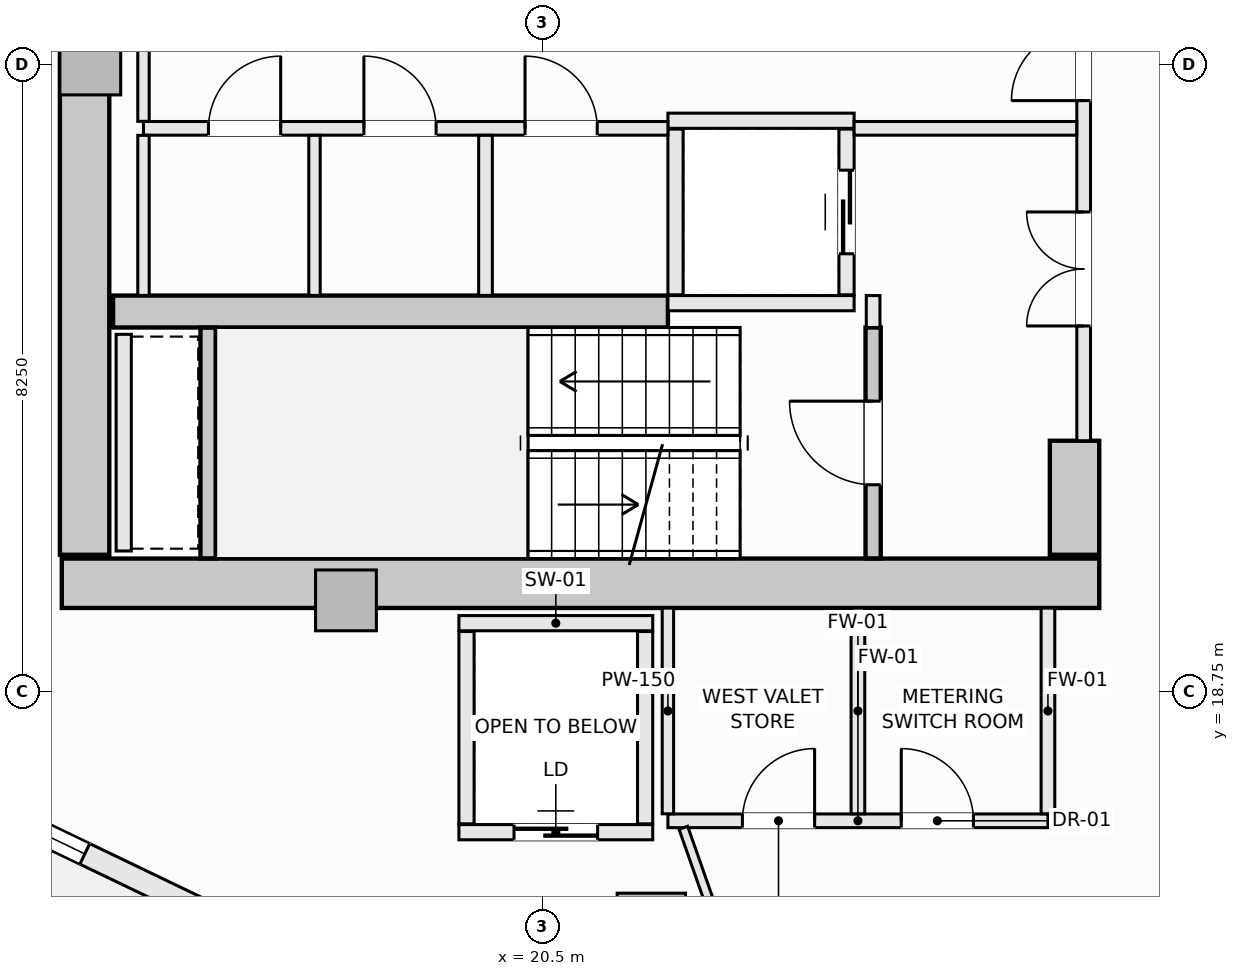
"""IFC4 building model, lengths in metres.
Left out: names, types, materials, properties, quantities, classifications, styles, units other than length and angle.
Written with IfcOpenShell. Run it as: python <this file> out.ifc"""

import sys

from ifc_helpers import new_model, si_unit, direction, frame, frame_2d, origin, origin_2d, place, context, subcontext, project, spatial, rectangle, extrude, element, fill, save


model = new_model("IFC4")
c1 = context("Model", 3, precision=1e-05, world=origin(), true_north=direction((0.0, 1.0)))
c2 = subcontext(c1, "Body", "Model", "MODEL_VIEW")
j1 = project(units=[si_unit("LENGTHUNIT", "METRE"), si_unit("PLANEANGLEUNIT", "RADIAN")], contexts=[c1])
p1 = place(None, origin())
s1 = spatial("IfcSite", under=j1, at=p1, CompositionType="ELEMENT")
p2 = place(p1, origin())
s2 = spatial("IfcBuilding", under=s1, at=p2, CompositionType="ELEMENT")
p3 = place(p2, frame((0.0, 0.0, 176.7)))
s3 = spatial("IfcBuildingStorey", under=s2, at=p3, CompositionType="ELEMENT", Elevation=176.7)
p4 = place(p3, frame((14.175, 20.175, -0.27), z_axis=(0.0, 0.0, 1.0), x_axis=(1.0, 0.0, 0.0)))
e1 = element("IfcWall", 1, at=p4, inside=s3, PredefinedType="SHEAR", context=c2, shape_type="SweptSolid", body=[
    extrude(rectangle(XDim=13.65, YDim=0.65, at=frame_2d((6.825, 0.0))), origin(), (0.0, 0.0, 1.0), 3.4),
])
p5 = place(p3, frame((14.475, 20.55, -0.27), z_axis=(0.0, 0.0, 1.0), x_axis=(0.0, 1.0, 0.0)))
e2 = element("IfcWall", 2, at=p5, inside=s3, PredefinedType="SHEAR", context=c2, shape_type="SweptSolid", body=[
    extrude(rectangle(XDim=12.9, YDim=0.65, at=frame_2d((6.45, 0.0))), origin(), (0.0, 0.0, 1.0), 3.4),
])
p6 = place(p3, frame((27.5, 20.55, -0.27), z_axis=(0.0, 0.0, 1.0), x_axis=(0.0, 1.0, 0.0)))
e3 = element("IfcWall", 3, at=p6, inside=s3, PredefinedType="SHEAR", context=c2, shape_type="SweptSolid", body=[
    extrude(rectangle(XDim=1.5, YDim=0.65, at=frame_2d((0.75, 0.0))), origin(), (0.0, 0.0, 1.0), 3.4),
])
p7 = place(p3, frame((14.85, 23.75, -0.27), z_axis=(0.0, 0.0, 1.0), x_axis=(1.0, 0.0, 0.0)))
e4 = element("IfcWall", 4, at=p7, inside=s3, PredefinedType="SHEAR", context=c2, shape_type="SweptSolid", body=[
    extrude(rectangle(XDim=7.3, YDim=0.42, at=frame_2d((3.65, 0.0))), origin(), (0.0, 0.0, 1.0), 3.4),
])
p8 = place(p3, frame((21.932, 15.648, -0.27), z_axis=(0.0, 0.0, 1.0), x_axis=(1.0, 0.0, 0.0)))
e5 = element("IfcColumn", 5, at=p8, inside=s3, PredefinedType="COLUMN", context=c2, shape_type="SweptSolid", body=[
    extrude(rectangle(XDim=0.9, YDim=0.9, at=origin_2d()), origin(), (0.0, 0.0, 1.0), 3.4),
])
for number, where, z_axis, x_axis in (
    (6, (14.55, 27.0, -0.27), (0.0, 0.0, 1.0), (1.0, 0.0, 0.0)),
    (7, (17.914, 19.95, -0.27), (0.0, 0.0, 1.0), (1.0, 0.0, 0.0)),
):
    element("IfcColumn", number, at=place(p3, frame(where, z_axis=z_axis, x_axis=x_axis)), inside=s3, PredefinedType="PILASTER", context=c2, shape_type="SweptSolid", body=[
        extrude(rectangle(XDim=0.8, YDim=0.8, at=origin_2d()), origin(), (0.0, 0.0, 1.0), 3.4),
    ])
p9 = place(p3, frame((11.127, 18.225, 0.0), z_axis=(0.0, 0.0, 1.0), x_axis=(0.901353070301, -0.433085029363, 0.0)))
e8 = element("IfcWall", 8, at=p9, inside=s3, PredefinedType="SOLIDWALL", context=c2, shape_type="SweptSolid", body=[
    extrude(rectangle(XDim=5.336, YDim=0.3, at=frame_2d((2.668, 0.0))), origin(), (0.0, 0.0, 1.0), 2.653),
])
p10 = place(p9, frame((1.618, 0.0, 0.74)))
e9 = element("IfcOpeningElement", 9, at=p10, cuts=e8, PredefinedType="OPENING", context=c2, shape_type="SweptSolid", body=[
    extrude(rectangle(XDim=2.1, YDim=1.7, at=frame_2d((1.05, 0.85))), frame((0.0, 0.16, 0.0), z_axis=(0.0, -1.0, 0.0), x_axis=(1.0, 0.0, 0.0)), (0.0, 0.0, 1.0), 0.32),
])
p11 = place(p3, frame((24.85, 20.502, -0.27), z_axis=(0.0, 0.0, 1.0), x_axis=(0.0, 1.0, 0.0)))
e10 = element("IfcWall", 10, at=p11, inside=s3, PredefinedType="SHEAR", context=c2, shape_type="SweptSolid", body=[
    extrude(rectangle(XDim=3.038, YDim=0.2, at=frame_2d((1.519, 0.0))), origin(), (0.0, 0.0, 1.0), 3.4),
])
p12 = place(p11, frame((0.969, 0.0, 0.27)))
e11 = element("IfcOpeningElement", 11, at=p12, cuts=e10, PredefinedType="OPENING", context=c2, shape_type="SweptSolid", body=[
    extrude(rectangle(XDim=1.1, YDim=2.15, at=frame_2d((0.55, 1.075))), frame((0.0, 0.11, 0.0), z_axis=(0.0, -1.0, 0.0), x_axis=(1.0, 0.0, 0.0)), (0.0, 0.0, 1.0), 0.22),
])
p13 = place(p3, frame((16.1, 20.502, -0.27), z_axis=(0.0, 0.0, 1.0), x_axis=(0.0, 1.0, 0.0)))
e12 = element("IfcWall", 12, at=p13, inside=s3, PredefinedType="SHEAR", context=c2, shape_type="SweptSolid", body=[
    extrude(rectangle(XDim=3.036, YDim=0.2, at=frame_2d((1.518, 0.0))), origin(), (0.0, 0.0, 1.0), 3.4),
])
for number, where, z_axis, x_axis in (
    (13, (22.15, 26.26, 0.0), (0.0, 0.0, 1.0), (1.0, 0.0, 0.0)),
    (14, (22.15, 23.86, 0.0), (0.0, 0.0, 1.0), (1.0, 0.0, 0.0)),
):
    element("IfcWall", number, at=place(p3, frame(where, z_axis=z_axis, x_axis=x_axis)), inside=s3, PredefinedType="SOLIDWALL", context=c2, shape_type="SweptSolid", body=[
        extrude(rectangle(XDim=2.45, YDim=0.2, at=frame_2d((1.225, 0.0))), origin(), (0.0, 0.0, 1.0), 3.13),
    ])
p14 = place(p3, frame((22.25, 23.97, 0.0), z_axis=(0.0, 0.0, 1.0), x_axis=(0.0, 1.0, 0.0)))
e15 = element("IfcWall", 15, at=p14, inside=s3, PredefinedType="SOLIDWALL", context=c2, shape_type="SweptSolid", body=[
    extrude(rectangle(XDim=2.18, YDim=0.2, at=frame_2d((1.09, 0.0))), origin(), (0.0, 0.0, 1.0), 3.13),
])
p15 = place(p3, frame((24.5, 23.97, 0.0), z_axis=(0.0, 0.0, 1.0), x_axis=(0.0, 1.0, 0.0)))
e16 = element("IfcWall", 16, at=p15, inside=s3, PredefinedType="SOLIDWALL", context=c2, shape_type="SweptSolid", body=[
    extrude(rectangle(XDim=2.18, YDim=0.2, at=frame_2d((1.09, 0.0))), origin(), (0.0, 0.0, 1.0), 3.13),
])
p16 = place(p15, frame((0.54, 0.0, 0.0)))
e17 = element("IfcOpeningElement", 17, at=p16, cuts=e16, PredefinedType="OPENING", context=c2, shape_type="SweptSolid", body=[
    extrude(rectangle(XDim=1.1, YDim=2.2, at=frame_2d((0.55, 1.1))), frame((0.0, 0.11, 0.0), z_axis=(0.0, -1.0, 0.0), x_axis=(1.0, 0.0, 0.0)), (0.0, 0.0, 1.0), 0.22),
])
p17 = place(p3, frame((19.4, 19.65, 0.0), z_axis=(0.0, 0.0, 1.0), x_axis=(1.0, 0.0, 0.0)))
e18 = element("IfcWall", 18, at=p17, inside=s3, PredefinedType="SOLIDWALL", context=c2, shape_type="SweptSolid", body=[
    extrude(rectangle(XDim=2.55, YDim=0.2, at=frame_2d((1.275, 0.0))), origin(), (0.0, 0.0, 1.0), 3.13),
])
p18 = place(p3, frame((19.4, 16.9, 0.0), z_axis=(0.0, 0.0, 1.0), x_axis=(1.0, 0.0, 0.0)))
e19 = element("IfcWall", 19, at=p18, inside=s3, PredefinedType="SOLIDWALL", context=c2, shape_type="SweptSolid", body=[
    extrude(rectangle(XDim=2.55, YDim=0.2, at=frame_2d((1.275, 0.0))), origin(), (0.0, 0.0, 1.0), 3.13),
])
p19 = place(p18, frame((0.725, 0.0, 0.0)))
e20 = element("IfcOpeningElement", 20, at=p19, cuts=e19, PredefinedType="OPENING", context=c2, shape_type="SweptSolid", body=[
    extrude(rectangle(XDim=1.1, YDim=2.2, at=frame_2d((0.55, 1.1))), frame((0.0, 0.11, 0.0), z_axis=(0.0, -1.0, 0.0), x_axis=(1.0, 0.0, 0.0)), (0.0, 0.0, 1.0), 0.22),
])
for number, where, z_axis, x_axis in (
    (21, (19.5, 17.01, 0.0), (0.0, 0.0, 1.0), (0.0, 1.0, 0.0)),
    (22, (21.85, 17.01, 0.0), (0.0, 0.0, 1.0), (0.0, 1.0, 0.0)),
):
    element("IfcWall", number, at=place(p3, frame(where, z_axis=z_axis, x_axis=x_axis)), inside=s3, PredefinedType="SOLIDWALL", context=c2, shape_type="SweptSolid", body=[
        extrude(rectangle(XDim=2.53, YDim=0.2, at=frame_2d((1.265, 0.0))), origin(), (0.0, 0.0, 1.0), 3.13),
    ])
p20 = place(p3, frame((14.99, 20.6, 0.0), z_axis=(0.0, 0.0, 1.0), x_axis=(0.0, 1.0, 0.0)))
e23 = element("IfcWall", 23, at=p20, inside=s3, PredefinedType="SOLIDWALL", context=c2, shape_type="SweptSolid", body=[
    extrude(rectangle(XDim=2.85, YDim=0.2, at=frame_2d((1.425, 0.0))), origin(), (0.0, 0.0, 1.0), 3.13),
])
p21 = place(p3, frame((24.85, 23.54, 0.0), z_axis=(0.0, 0.0, 1.0), x_axis=(0.0, 1.0, 0.0)))
e24 = element("IfcWall", 24, at=p21, inside=s3, PredefinedType="SOLIDWALL", context=c2, shape_type="SweptSolid", body=[
    extrude(rectangle(XDim=0.42, YDim=0.18, at=frame_2d((0.21, 0.0))), origin(), (0.0, 0.0, 1.0), 3.13),
])
p22 = place(p3, frame((27.62, 22.05, 0.0), z_axis=(0.0, 0.0, 1.0), x_axis=(0.0, 1.0, 0.0)))
e25 = element("IfcWall", 25, at=p22, inside=s3, PredefinedType="SOLIDWALL", context=c2, shape_type="SweptSolid", body=[
    extrude(rectangle(XDim=9.9, YDim=0.18, at=frame_2d((4.95, 0.0))), origin(), (0.0, 0.0, 1.0), 3.13),
])
p23 = place(p22, frame((4.475, 0.0, 0.0)))
e26 = element("IfcOpeningElement", 26, at=p23, cuts=e25, PredefinedType="OPENING", context=c2, shape_type="SweptSolid", body=[
    extrude(rectangle(XDim=0.95, YDim=2.1, at=frame_2d((0.475, 1.05))), frame((0.0, 0.1, 0.0), z_axis=(0.0, -1.0, 0.0), x_axis=(1.0, 0.0, 0.0)), (0.0, 0.0, 1.0), 0.2),
])
p24 = place(p22, frame((6.89, 0.0, 0.0)))
e27 = element("IfcOpeningElement", 27, at=p24, cuts=e25, PredefinedType="OPENING", context=c2, shape_type="SweptSolid", body=[
    extrude(rectangle(XDim=1.5, YDim=2.2, at=frame_2d((0.75, 1.1))), frame((0.0, 0.1, 0.0), z_axis=(0.0, -1.0, 0.0), x_axis=(1.0, 0.0, 0.0)), (0.0, 0.0, 1.0), 0.2),
])
p25 = place(p22, frame((1.51, 0.0, 0.0)))
e28 = element("IfcOpeningElement", 28, at=p25, cuts=e25, PredefinedType="OPENING", context=c2, shape_type="SweptSolid", body=[
    extrude(rectangle(XDim=1.5, YDim=2.2, at=frame_2d((0.75, 1.1))), frame((0.0, 0.1, 0.0), z_axis=(0.0, -1.0, 0.0), x_axis=(1.0, 0.0, 0.0)), (0.0, 0.0, 1.0), 0.2),
])
p26 = place(p3, frame((15.25, 26.16, 0.0), z_axis=(0.0, 0.0, 1.0), x_axis=(1.0, 0.0, 0.0)))
e29 = element("IfcWall", 29, at=p26, inside=s3, PredefinedType="SOLIDWALL", context=c2, shape_type="SweptSolid", body=[
    extrude(rectangle(XDim=6.9, YDim=0.18, at=frame_2d((3.45, 0.0))), origin(), (0.0, 0.0, 1.0), 3.13),
])
p27 = place(p26, frame((5.02, 0.0, 0.0)))
e30 = element("IfcOpeningElement", 30, at=p27, cuts=e29, PredefinedType="OPENING", context=c2, shape_type="SweptSolid", body=[
    extrude(rectangle(XDim=0.95, YDim=2.1, at=frame_2d((0.475, 1.05))), frame((0.0, 0.1, 0.0), z_axis=(0.0, -1.0, 0.0), x_axis=(1.0, 0.0, 0.0)), (0.0, 0.0, 1.0), 0.2),
])
p28 = place(p26, frame((0.855, 0.0, 0.0)))
e31 = element("IfcOpeningElement", 31, at=p28, cuts=e29, PredefinedType="OPENING", context=c2, shape_type="SweptSolid", body=[
    extrude(rectangle(XDim=0.95, YDim=2.1, at=frame_2d((0.475, 1.05))), frame((0.0, 0.1, 0.0), z_axis=(0.0, -1.0, 0.0), x_axis=(1.0, 0.0, 0.0)), (0.0, 0.0, 1.0), 0.2),
])
p29 = place(p26, frame((2.9, 0.0, 0.0)))
e32 = element("IfcOpeningElement", 32, at=p29, cuts=e29, PredefinedType="OPENING", context=c2, shape_type="SweptSolid", body=[
    extrude(rectangle(XDim=0.95, YDim=2.1, at=frame_2d((0.475, 1.05))), frame((0.0, 0.1, 0.0), z_axis=(0.0, -1.0, 0.0), x_axis=(1.0, 0.0, 0.0)), (0.0, 0.0, 1.0), 0.2),
])
p30 = place(p3, frame((24.6, 26.16, 0.0), z_axis=(0.0, 0.0, 1.0), x_axis=(1.0, 0.0, 0.0)))
e33 = element("IfcWall", 33, at=p30, inside=s3, PredefinedType="SOLIDWALL", context=c2, shape_type="SweptSolid", body=[
    extrude(rectangle(XDim=2.928, YDim=0.18, at=frame_2d((1.464, 0.0))), origin(), (0.0, 0.0, 1.0), 3.13),
])
p31 = place(p3, frame((15.25, 23.962, 0.0), z_axis=(0.0, 0.0, 1.0), x_axis=(0.0, 1.0, 0.0)))
e34 = element("IfcWall", 34, at=p31, inside=s3, PredefinedType="PARTITIONING", context=c2, shape_type="SweptSolid", body=[
    extrude(rectangle(XDim=2.106, YDim=0.15, at=frame_2d((1.053, 0.0))), origin(), (0.0, 0.0, 1.0), 3.13),
])
p32 = place(p3, frame((15.25, 26.252, 0.0), z_axis=(0.0, 0.0, 1.0), x_axis=(0.0, 1.0, 0.0)))
e35 = element("IfcWall", 35, at=p32, inside=s3, PredefinedType="PARTITIONING", context=c2, shape_type="SweptSolid", body=[
    extrude(rectangle(XDim=1.496, YDim=0.15, at=frame_2d((0.748, 0.0))), origin(), (0.0, 0.0, 1.0), 3.13),
])
p33 = place(p3, frame((19.75, 23.962, 0.0), z_axis=(0.0, 0.0, 1.0), x_axis=(0.0, 1.0, 0.0)))
e36 = element("IfcWall", 36, at=p33, inside=s3, PredefinedType="SOLIDWALL", context=c2, shape_type="SweptSolid", body=[
    extrude(rectangle(XDim=2.106, YDim=0.18, at=frame_2d((1.053, 0.0))), origin(), (0.0, 0.0, 1.0), 3.13),
])
p34 = place(p3, frame((17.5, 23.962, 0.0), z_axis=(0.0, 0.0, 1.0), x_axis=(0.0, 1.0, 0.0)))
e37 = element("IfcWall", 37, at=p34, inside=s3, PredefinedType="PARTITIONING", context=c2, shape_type="SweptSolid", body=[
    extrude(rectangle(XDim=2.106, YDim=0.15, at=frame_2d((1.053, 0.0))), origin(), (0.0, 0.0, 1.0), 3.13),
])
p35 = place(p3, frame((22.15, 17.05, 0.0), z_axis=(0.0, 0.0, 1.0), x_axis=(1.0, 0.0, 0.0)))
e38 = element("IfcWall", 38, at=p35, inside=s3, PredefinedType="SOLIDWALL", context=c2, shape_type="SweptSolid", body=[
    extrude(rectangle(XDim=5.0, YDim=0.18, at=frame_2d((2.5, 0.0))), origin(), (0.0, 0.0, 1.0), 3.13),
])
p36 = place(p35, frame((0.98, 0.0, 0.0)))
e39 = element("IfcOpeningElement", 39, at=p36, cuts=e38, PredefinedType="OPENING", context=c2, shape_type="SweptSolid", body=[
    extrude(rectangle(XDim=0.95, YDim=2.1, at=frame_2d((0.475, 1.05))), frame((0.0, 0.1, 0.0), z_axis=(0.0, -1.0, 0.0), x_axis=(1.0, 0.0, 0.0)), (0.0, 0.0, 1.0), 0.2),
])
p37 = place(p35, frame((3.07, 0.0, 0.0)))
e40 = element("IfcOpeningElement", 40, at=p37, cuts=e38, PredefinedType="OPENING", context=c2, shape_type="SweptSolid", body=[
    extrude(rectangle(XDim=0.95, YDim=2.1, at=frame_2d((0.475, 1.05))), frame((0.0, 0.1, 0.0), z_axis=(0.0, -1.0, 0.0), x_axis=(1.0, 0.0, 0.0)), (0.0, 0.0, 1.0), 0.2),
])
p38 = place(p3, frame((22.15, 17.142, 0.0), z_axis=(0.0, 0.0, 1.0), x_axis=(0.0, 1.0, 0.0)))
e41 = element("IfcWall", 41, at=p38, inside=s3, PredefinedType="PARTITIONING", context=c2, shape_type="SweptSolid", body=[
    extrude(rectangle(XDim=2.706, YDim=0.15, at=frame_2d((1.353, 0.0))), origin(), (0.0, 0.0, 1.0), 3.13),
])
for number, where, z_axis, x_axis in (
    (42, (24.65, 17.142, 0.0), (0.0, 0.0, 1.0), (0.0, 1.0, 0.0)),
    (43, (27.15, 17.142, 0.0), (0.0, 0.0, 1.0), (0.0, 1.0, 0.0)),
):
    element("IfcWall", number, at=place(p3, frame(where, z_axis=z_axis, x_axis=x_axis)), inside=s3, PredefinedType="SOLIDWALL", context=c2, shape_type="SweptSolid", body=[
        extrude(rectangle(XDim=2.706, YDim=0.18, at=frame_2d((1.353, 0.0))), origin(), (0.0, 0.0, 1.0), 3.13),
    ])
p39 = place(p3, frame((22.353, 16.958, 0.0), z_axis=(0.0, 0.0, 1.0), x_axis=(0.331370038458, -0.943500873138, 0.0)))
e44 = element("IfcWall", 44, at=p39, inside=s3, PredefinedType="PARTITIONING", context=c2, shape_type="SweptSolid", body=[
    extrude(rectangle(XDim=1.216, YDim=0.12, at=frame_2d((0.608, 0.0))), origin(), (0.0, 0.0, 1.0), 3.13),
])
p40 = place(p10, origin())
e45 = element("IfcWindow", 45, at=p40, inside=s3, PartitioningType="SINGLE_PANEL", PredefinedType="WINDOW", context=c2, shape_type="SweptSolid", body=[
    extrude(rectangle(XDim=2.1, YDim=1.7, at=frame_2d((1.05, 0.85))), frame((0.0, 0.03, 0.0), z_axis=(0.0, -1.0, 0.0), x_axis=(1.0, 0.0, 0.0)), (0.0, 0.0, 1.0), 0.06),
])
fill(e9, e45)
p41 = place(p12, origin())
e46 = element("IfcDoor", 46, at=p41, inside=s3, OperationType="SINGLE_SWING_RIGHT", PredefinedType="DOOR", context=c2, shape_type="SweptSolid", body=[
    extrude(rectangle(XDim=1.1, YDim=2.15, at=frame_2d((0.55, 1.075))), frame((0.0, 0.025, 0.0), z_axis=(0.0, -1.0, 0.0), x_axis=(1.0, 0.0, 0.0)), (0.0, 0.0, 1.0), 0.05),
])
fill(e11, e46)
p42 = place(p16, origin())
e47 = element("IfcDoor", 47, at=p42, inside=s3, OperationType="SLIDING_TO_LEFT", PredefinedType="DOOR", context=c2, shape_type="SweptSolid", body=[
    extrude(rectangle(XDim=1.1, YDim=2.2, at=frame_2d((0.55, 1.1))), frame((0.0, 0.025, 0.0), z_axis=(0.0, -1.0, 0.0), x_axis=(1.0, 0.0, 0.0)), (0.0, 0.0, 1.0), 0.05),
])
fill(e17, e47)
p43 = place(p19, origin())
e48 = element("IfcDoor", 48, at=p43, inside=s3, OperationType="SLIDING_TO_LEFT", PredefinedType="DOOR", context=c2, shape_type="SweptSolid", body=[
    extrude(rectangle(XDim=1.1, YDim=2.2, at=frame_2d((0.55, 1.1))), frame((0.0, 0.025, 0.0), z_axis=(0.0, -1.0, 0.0), x_axis=(1.0, 0.0, 0.0)), (0.0, 0.0, 1.0), 0.05),
])
fill(e20, e48)
p44 = place(p23, origin())
e49 = element("IfcDoor", 49, at=p44, inside=s3, OperationType="SINGLE_SWING_LEFT", PredefinedType="DOOR", context=c2, shape_type="SweptSolid", body=[
    extrude(rectangle(XDim=0.95, YDim=2.1, at=frame_2d((0.475, 1.05))), frame((0.0, 0.025, 0.0), z_axis=(0.0, -1.0, 0.0), x_axis=(1.0, 0.0, 0.0)), (0.0, 0.0, 1.0), 0.05),
])
fill(e26, e49)
p45 = place(p25, origin())
e50 = element("IfcDoor", 50, at=p45, inside=s3, OperationType="DOUBLE_DOOR_SINGLE_SWING", PredefinedType="DOOR", context=c2, shape_type="SweptSolid", body=[
    extrude(rectangle(XDim=1.5, YDim=2.2, at=frame_2d((0.75, 1.1))), frame((0.0, 0.025, 0.0), z_axis=(0.0, -1.0, 0.0), x_axis=(1.0, 0.0, 0.0)), (0.0, 0.0, 1.0), 0.05),
])
fill(e28, e50)
p46 = place(p27, origin())
e51 = element("IfcDoor", 51, at=p46, inside=s3, OperationType="SINGLE_SWING_LEFT", PredefinedType="DOOR", context=c2, shape_type="SweptSolid", body=[
    extrude(rectangle(XDim=0.95, YDim=2.1, at=frame_2d((0.475, 1.05))), frame((0.0, 0.025, 0.0), z_axis=(0.0, -1.0, 0.0), x_axis=(1.0, 0.0, 0.0)), (0.0, 0.0, 1.0), 0.05),
])
fill(e30, e51)
p47 = place(p28, origin())
e52 = element("IfcDoor", 52, at=p47, inside=s3, OperationType="SINGLE_SWING_RIGHT", PredefinedType="DOOR", context=c2, shape_type="SweptSolid", body=[
    extrude(rectangle(XDim=0.95, YDim=2.1, at=frame_2d((0.475, 1.05))), frame((0.0, 0.025, 0.0), z_axis=(0.0, -1.0, 0.0), x_axis=(1.0, 0.0, 0.0)), (0.0, 0.0, 1.0), 0.05),
])
fill(e31, e52)
p48 = place(p29, origin())
e53 = element("IfcDoor", 53, at=p48, inside=s3, OperationType="SINGLE_SWING_LEFT", PredefinedType="DOOR", context=c2, shape_type="SweptSolid", body=[
    extrude(rectangle(XDim=0.95, YDim=2.1, at=frame_2d((0.475, 1.05))), frame((0.0, 0.025, 0.0), z_axis=(0.0, -1.0, 0.0), x_axis=(1.0, 0.0, 0.0)), (0.0, 0.0, 1.0), 0.05),
])
fill(e32, e53)
p49 = place(p36, origin())
e54 = element("IfcDoor", 54, at=p49, inside=s3, OperationType="SINGLE_SWING_RIGHT", PredefinedType="DOOR", context=c2, shape_type="SweptSolid", body=[
    extrude(rectangle(XDim=0.95, YDim=2.1, at=frame_2d((0.475, 1.05))), frame((0.0, 0.025, 0.0), z_axis=(0.0, -1.0, 0.0), x_axis=(1.0, 0.0, 0.0)), (0.0, 0.0, 1.0), 0.05),
])
fill(e39, e54)
p50 = place(p37, origin())
e55 = element("IfcDoor", 55, at=p50, inside=s3, OperationType="SINGLE_SWING_LEFT", PredefinedType="DOOR", context=c2, shape_type="SweptSolid", body=[
    extrude(rectangle(XDim=0.95, YDim=2.1, at=frame_2d((0.475, 1.05))), frame((0.0, 0.025, 0.0), z_axis=(0.0, -1.0, 0.0), x_axis=(1.0, 0.0, 0.0)), (0.0, 0.0, 1.0), 0.05),
])
fill(e40, e55)
save(model, sys.argv[1])
